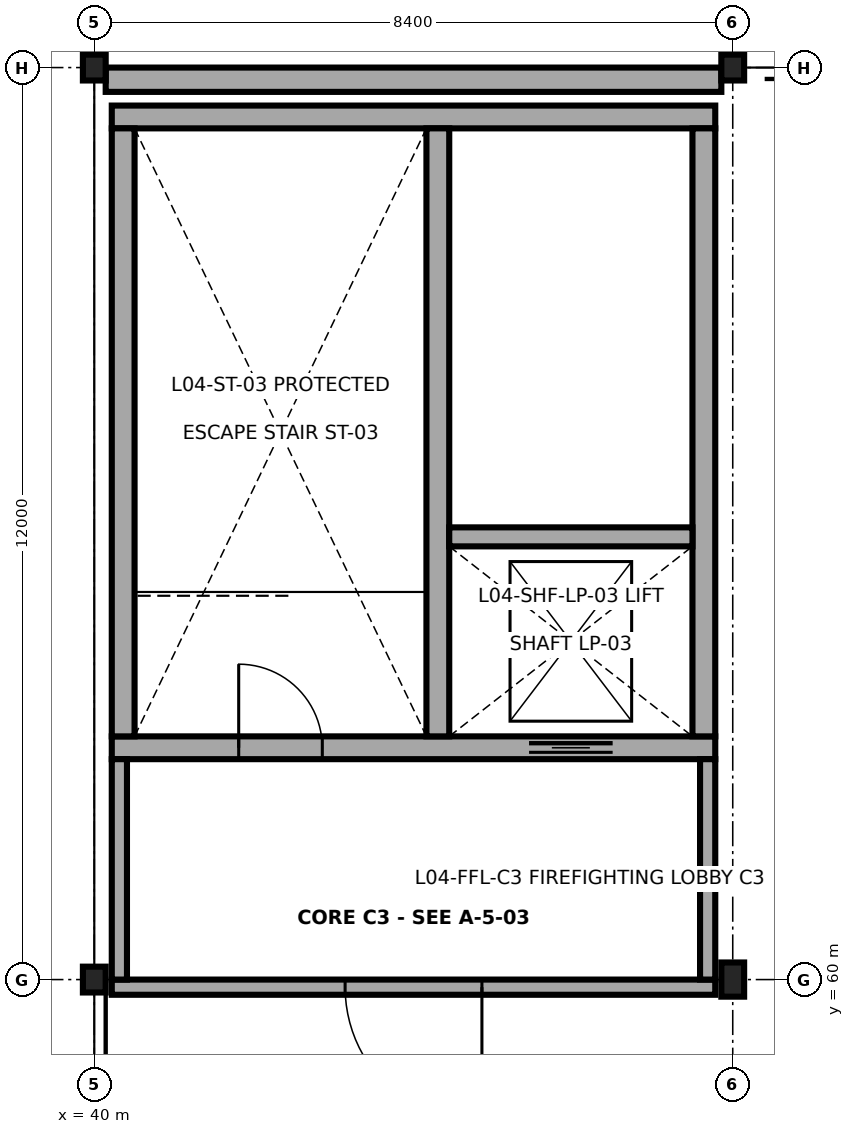
"""IFC4 building model, lengths in metres.
Left out: names, types, materials, properties, quantities, classifications, styles, units other than length and angle.
Written with IfcOpenShell. Run it as: python <this file> out.ifc"""

import sys

from ifc_helpers import new_model, si_unit, direction, frame, frame_2d, origin, origin_2d, place, context, subcontext, project, spatial, rectangle, i_section, extrude, element, fill, save


model = new_model("IFC4")
c1 = context("Model", 3, precision=1e-05, world=origin(), true_north=direction((0.0, 1.0)))
c2 = subcontext(c1, "Body", "Model", "MODEL_VIEW")
j1 = project(units=[si_unit("LENGTHUNIT", "METRE"), si_unit("PLANEANGLEUNIT", "RADIAN")], contexts=[c1])
p1 = place(None, origin())
s1 = spatial("IfcSite", under=j1, at=p1, CompositionType="ELEMENT")
p2 = place(p1, origin())
s2 = spatial("IfcBuilding", under=s1, at=p2, CompositionType="ELEMENT")
p3 = place(p2, frame((0.0, 0.0, 21.9)))
s3 = spatial("IfcBuildingStorey", under=s2, at=p3, CompositionType="ELEMENT", Elevation=21.9)
for number, where, z_axis, x_axis in (
    (1, (40.0, 60.0, 0.0), (0.0, 0.0, 1.0), (1.0, 0.0, 0.0)),
    (2, (40.0, 72.0, 0.0), (0.0, 0.0, 1.0), (1.0, 0.0, 0.0)),
):
    element("IfcColumn", number, at=place(p3, frame(where, z_axis=z_axis, x_axis=x_axis)), inside=s3, PredefinedType="COLUMN", context=c2, shape_type="SweptSolid", body=[
        extrude(i_section(OverallWidth=0.3, OverallDepth=0.34, WebThickness=0.012, FlangeThickness=0.021, FilletRadius=0.027, at=origin_2d()), origin(), (0.0, 0.0, 1.0), 3.5),
    ])
p4 = place(p3, frame((48.4, 60.0, 0.0), z_axis=(0.0, 0.0, 1.0), x_axis=(1.0, 0.0, 0.0)))
e3 = element("IfcColumn", 3, at=p4, inside=s3, PredefinedType="COLUMN", context=c2, shape_type="SweptSolid", body=[
    extrude(i_section(OverallWidth=0.3, OverallDepth=0.45, WebThickness=0.014, FlangeThickness=0.026, FilletRadius=0.027, at=origin_2d()), origin(), (0.0, 0.0, 1.0), 3.5),
])
p5 = place(p3, frame((48.4, 72.0, 0.0), z_axis=(0.0, 0.0, 1.0), x_axis=(1.0, 0.0, 0.0)))
e4 = element("IfcColumn", 4, at=p5, inside=s3, PredefinedType="COLUMN", context=c2, shape_type="SweptSolid", body=[
    extrude(i_section(OverallWidth=0.3, OverallDepth=0.34, WebThickness=0.012, FlangeThickness=0.021, FilletRadius=0.027, at=origin_2d()), origin(), (0.0, 0.0, 1.0), 3.5),
])
p6 = place(p3, frame((48.25, 71.84, 0.0), z_axis=(0.0, 0.0, 1.0), x_axis=(-1.0, 0.0, 0.0)))
e5 = element("IfcWall", 5, at=p6, inside=s3, PredefinedType="SOLIDWALL", context=c2, shape_type="SweptSolid", body=[
    extrude(rectangle(XDim=8.1, YDim=0.32, at=frame_2d((4.05, 0.0))), origin(), (0.0, 0.0, 1.0), 2.52),
])
p7 = place(p3, frame((40.23, 63.05, 0.0), z_axis=(0.0, 0.0, 1.0), x_axis=(1.0, 0.0, 0.0)))
e6 = element("IfcWall", 6, at=p7, inside=s3, PredefinedType="SHEAR", context=c2, shape_type="SweptSolid", body=[
    extrude(rectangle(XDim=7.94, YDim=0.3, at=frame_2d((3.97, 0.0))), origin(), (0.0, 0.0, 1.0), 4.25),
])
p8 = place(p7, frame((1.67, 0.0, 0.0)))
e7 = element("IfcOpeningElement", 7, at=p8, cuts=e6, PredefinedType="OPENING", context=c2, shape_type="SweptSolid", body=[
    extrude(rectangle(XDim=1.1, YDim=2.2, at=frame_2d((0.55, 1.1))), frame((0.0, 0.16, 0.0), z_axis=(0.0, -1.0, 0.0), x_axis=(1.0, 0.0, 0.0)), (0.0, 0.0, 1.0), 0.32),
])
p9 = place(p7, frame((5.49, 0.0, 0.0)))
e8 = element("IfcOpeningElement", 8, at=p9, cuts=e6, PredefinedType="OPENING", context=c2, shape_type="SweptSolid", body=[
    extrude(rectangle(XDim=1.1, YDim=2.1, at=frame_2d((0.55, 1.05))), frame((0.0, 0.16, 0.0), z_axis=(0.0, -1.0, 0.0), x_axis=(1.0, 0.0, 0.0)), (0.0, 0.0, 1.0), 0.32),
])
p10 = place(p3, frame((48.17, 71.35, 0.0), z_axis=(0.0, 0.0, 1.0), x_axis=(-1.0, 0.0, 0.0)))
e9 = element("IfcWall", 9, at=p10, inside=s3, PredefinedType="SHEAR", context=c2, shape_type="SweptSolid", body=[
    extrude(rectangle(XDim=7.94, YDim=0.3, at=frame_2d((3.97, 0.0))), origin(), (0.0, 0.0, 1.0), 4.25),
])
for number, where, z_axis, x_axis in (
    (10, (40.38, 71.2, 0.0), (0.0, 0.0, 1.0), (0.0, -1.0, 0.0)),
    (11, (48.02, 63.2, 0.0), (0.0, 0.0, 1.0), (0.0, 1.0, 0.0)),
    (12, (44.52, 63.2, 0.0), (0.0, 0.0, 1.0), (0.0, 1.0, 0.0)),
):
    element("IfcWall", number, at=place(p3, frame(where, z_axis=z_axis, x_axis=x_axis)), inside=s3, PredefinedType="SHEAR", context=c2, shape_type="SweptSolid", body=[
        extrude(rectangle(XDim=8.0, YDim=0.3, at=frame_2d((4.0, 0.0))), origin(), (0.0, 0.0, 1.0), 4.25),
    ])
p11 = place(p3, frame((44.67, 65.825, 0.0), z_axis=(0.0, 0.0, 1.0), x_axis=(1.0, 0.0, 0.0)))
e13 = element("IfcWall", 13, at=p11, inside=s3, PredefinedType="SHEAR", context=c2, shape_type="SweptSolid", body=[
    extrude(rectangle(XDim=3.2, YDim=0.25, at=frame_2d((1.6, 0.0))), origin(), (0.0, 0.0, 1.0), 4.25),
])
p12 = place(p3, frame((48.17, 59.9, 0.0), z_axis=(0.0, 0.0, 1.0), x_axis=(-1.0, 0.0, 0.0)))
e14 = element("IfcWall", 14, at=p12, inside=s3, PredefinedType="SOLIDWALL", context=c2, shape_type="SweptSolid", body=[
    extrude(rectangle(XDim=7.94, YDim=0.2, at=frame_2d((3.97, 0.0))), origin(), (0.0, 0.0, 1.0), 4.235),
])
p13 = place(p12, frame((3.07, 0.0, 0.0)))
e15 = element("IfcOpeningElement", 15, at=p13, cuts=e14, PredefinedType="OPENING", context=c2, shape_type="SweptSolid", body=[
    extrude(rectangle(XDim=1.8, YDim=2.2, at=frame_2d((0.9, 1.1))), frame((0.0, 0.11, 0.0), z_axis=(0.0, -1.0, 0.0), x_axis=(1.0, 0.0, 0.0)), (0.0, 0.0, 1.0), 0.22),
])
for number, where, z_axis, x_axis in (
    (16, (40.33, 60.0, 0.0), (0.0, 0.0, 1.0), (0.0, 1.0, 0.0)),
    (17, (48.07, 62.9, 0.0), (0.0, 0.0, 1.0), (0.0, -1.0, 0.0)),
):
    element("IfcWall", number, at=place(p3, frame(where, z_axis=z_axis, x_axis=x_axis)), inside=s3, PredefinedType="SOLIDWALL", context=c2, shape_type="SweptSolid", body=[
        extrude(rectangle(XDim=2.9, YDim=0.2, at=frame_2d((1.45, 0.0))), origin(), (0.0, 0.0, 1.0), 4.235),
    ])
p14 = place(p8, origin())
e18 = element("IfcDoor", 18, at=p14, inside=s3, OperationType="SINGLE_SWING_LEFT", PredefinedType="DOOR", context=c2, shape_type="SweptSolid", body=[
    extrude(rectangle(XDim=1.1, YDim=2.2, at=frame_2d((0.55, 1.1))), frame((0.0, 0.025, 0.0), z_axis=(0.0, -1.0, 0.0), x_axis=(1.0, 0.0, 0.0)), (0.0, 0.0, 1.0), 0.05),
])
fill(e7, e18)
p15 = place(p9, origin())
e19 = element("IfcDoor", 19, at=p15, inside=s3, OperationType="SLIDING_TO_LEFT", PredefinedType="DOOR", context=c2, shape_type="SweptSolid", body=[
    extrude(rectangle(XDim=1.1, YDim=2.1, at=frame_2d((0.55, 1.05))), frame((0.0, 0.025, 0.0), z_axis=(0.0, -1.0, 0.0), x_axis=(1.0, 0.0, 0.0)), (0.0, 0.0, 1.0), 0.05),
])
fill(e8, e19)
p16 = place(p13, origin())
e20 = element("IfcDoor", 20, at=p16, inside=s3, OperationType="DOUBLE_DOOR_SINGLE_SWING", PredefinedType="DOOR", context=c2, shape_type="SweptSolid", body=[
    extrude(rectangle(XDim=1.8, YDim=2.2, at=frame_2d((0.9, 1.1))), frame((0.0, 0.025, 0.0), z_axis=(0.0, -1.0, 0.0), x_axis=(1.0, 0.0, 0.0)), (0.0, 0.0, 1.0), 0.05),
])
fill(e15, e20)
save(model, sys.argv[1])
